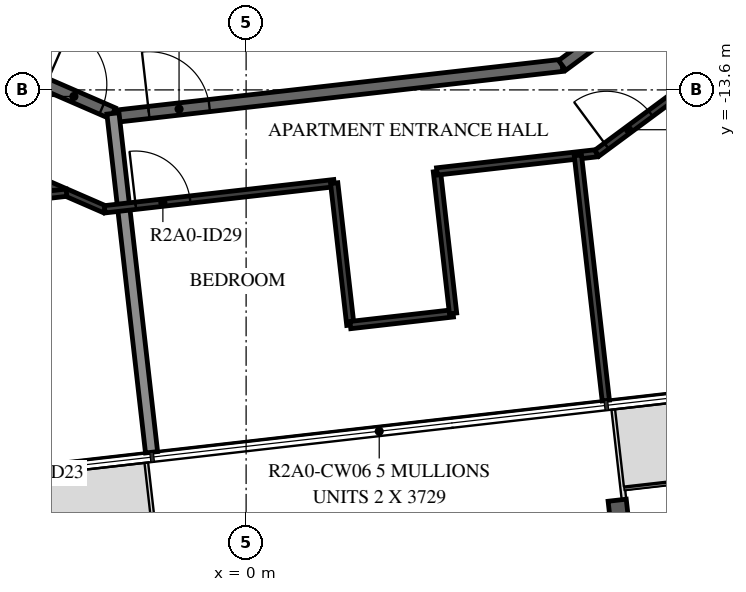
"""IFC4 building model, lengths in metres.
Left out: names, types, materials, properties, quantities, classifications, styles, units other than length and angle.
Written with IfcOpenShell. Run it as: python <this file> out.ifc"""

import sys

from ifc_helpers import new_model, si_unit, direction, frame, frame_2d, origin, origin_2d, place, context, subcontext, project, spatial, rectangle, i_section, extrude, element, fill, save


model = new_model("IFC4")
c1 = context("Model", 3, precision=1e-05, world=origin(), true_north=direction((0.0, 1.0)))
c2 = subcontext(c1, "Body", "Model", "MODEL_VIEW")
j1 = project(units=[si_unit("LENGTHUNIT", "METRE"), si_unit("PLANEANGLEUNIT", "RADIAN")], contexts=[c1])
p1 = place(None, origin())
s1 = spatial("IfcSite", under=j1, at=p1, CompositionType="ELEMENT")
p2 = place(p1, origin())
s2 = spatial("IfcBuilding", under=s1, at=p2, CompositionType="ELEMENT")
p3 = place(p2, frame((0.0, 0.0, 83.7)))
s3 = spatial("IfcBuildingStorey", under=s2, at=p3, CompositionType="ELEMENT", Elevation=83.7)
p4 = place(p3, frame((6.153, -20.795, -0.38), z_axis=(0.0, 0.0, 1.0), x_axis=(-0.993571881569, -0.113202986513, 0.0)))
e1 = element("IfcColumn", 1, at=p4, inside=s3, PredefinedType="COLUMN", context=c2, shape_type="SweptSolid", body=[
    extrude(i_section(OverallWidth=0.3, OverallDepth=0.9, WebThickness=0.019, FlangeThickness=0.035, FilletRadius=0.03, at=origin_2d()), origin(), (0.0, 0.0, 1.0), 3.5),
])
p5 = place(p3, frame((-8.829, -11.1, 0.0), z_axis=(0.0, 0.0, 1.0), x_axis=(0.917063622491, -0.398740908742, 0.0)))
e2 = element("IfcWall", 2, at=p5, inside=s3, PredefinedType="STANDARD", context=c2, shape_type="SweptSolid", body=[
    extrude(rectangle(XDim=7.24, YDim=0.2, at=frame_2d((3.62, 0.0))), origin(), (0.0, 0.0, 1.0), 3.12),
])
p6 = place(p5, frame((6.04, 0.0, 0.0)))
e3 = element("IfcOpeningElement", 3, at=p6, cuts=e2, PredefinedType="OPENING", context=c2, shape_type="SweptSolid", body=[
    extrude(rectangle(XDim=1.0, YDim=2.1, at=frame_2d((0.5, 1.05))), frame((0.0, 0.11, 0.0), z_axis=(0.0, -1.0, 0.0), x_axis=(1.0, 0.0, 0.0)), (0.0, 0.0, 1.0), 0.22),
])
p7 = place(p3, frame((-2.096, -14.028, 0.0), z_axis=(0.0, 0.0, 1.0), x_axis=(0.993569170114, 0.113226782163, 0.0)))
e4 = element("IfcWall", 4, at=p7, inside=s3, PredefinedType="STANDARD", context=c2, shape_type="SweptSolid", body=[
    extrude(rectangle(XDim=7.342, YDim=0.2, at=frame_2d((3.671, 0.0))), origin(), (0.0, 0.0, 1.0), 3.12),
])
p8 = place(p7, frame((0.5, 0.0, 0.0)))
e5 = element("IfcOpeningElement", 5, at=p8, cuts=e4, PredefinedType="OPENING", context=c2, shape_type="SweptSolid", body=[
    extrude(rectangle(XDim=1.0, YDim=2.1, at=frame_2d((0.5, 1.05))), frame((0.0, 0.11, 0.0), z_axis=(0.0, -1.0, 0.0), x_axis=(1.0, 0.0, 0.0)), (0.0, 0.0, 1.0), 0.22),
])
p9 = place(p3, frame((5.198, -13.196, 0.0), z_axis=(0.0, 0.0, 1.0), x_axis=(0.803869883159, 0.594805187394, 0.0)))
e6 = element("IfcWall", 6, at=p9, inside=s3, PredefinedType="STANDARD", context=c2, shape_type="SweptSolid", body=[
    extrude(rectangle(XDim=7.342, YDim=0.2, at=frame_2d((3.671, 0.0))), origin(), (0.0, 0.0, 1.0), 3.12),
])
p10 = place(p3, frame((-1.555, -19.559, 0.0), z_axis=(0.0, 0.0, 1.0), x_axis=(-0.113221250863, 0.993569800443, 0.0)))
e7 = element("IfcWall", 7, at=p10, inside=s3, PredefinedType="STANDARD", context=c2, shape_type="SweptSolid", body=[
    extrude(rectangle(XDim=5.609, YDim=0.2, at=frame_2d((2.804, 0.0))), origin(), (0.0, 0.0, 1.0), 2.73),
])
p11 = place(p3, frame((-9.796, -12.315, 0.0), z_axis=(0.0, 0.0, 1.0), x_axis=(0.917059572812, -0.398750222463, 0.0)))
e8 = element("IfcWall", 8, at=p11, inside=s3, PredefinedType="PARTITIONING", context=c2, shape_type="SweptSolid", body=[
    extrude(rectangle(XDim=8.146, YDim=0.12, at=frame_2d((4.073, 0.0))), origin(), (0.0, 0.0, 1.0), 3.12),
])
p12 = place(p11, frame((0.969, 0.0, 0.0)))
e9 = element("IfcOpeningElement", 9, at=p12, cuts=e8, PredefinedType="OPENING", context=c2, shape_type="SweptSolid", body=[
    extrude(rectangle(XDim=0.8, YDim=2.1, at=frame_2d((0.4, 1.05))), frame((0.0, 0.07, 0.0), z_axis=(0.0, -1.0, 0.0), x_axis=(1.0, 0.0, 0.0)), (0.0, 0.0, 1.0), 0.14),
])
p13 = place(p3, frame((-2.326, -15.563, 0.0), z_axis=(0.0, 0.0, 1.0), x_axis=(0.993575068384, 0.113175012641, 0.0)))
e10 = element("IfcWall", 10, at=p13, inside=s3, PredefinedType="PARTITIONING", context=c2, shape_type="SweptSolid", body=[
    extrude(rectangle(XDim=3.799, YDim=0.12, at=frame_2d((1.899, 0.0))), origin(), (0.0, 0.0, 1.0), 3.12),
])
p14 = place(p13, frame((0.513, 0.0, 0.0)))
e11 = element("IfcOpeningElement", 11, at=p14, cuts=e10, PredefinedType="OPENING", context=c2, shape_type="SweptSolid", body=[
    extrude(rectangle(XDim=0.9, YDim=2.1, at=frame_2d((0.45, 1.05))), frame((0.0, 0.07, 0.0), z_axis=(0.0, -1.0, 0.0), x_axis=(1.0, 0.0, 0.0)), (0.0, 0.0, 1.0), 0.14),
])
p15 = place(p3, frame((-17.437, -16.94, 0.0), z_axis=(0.0, 0.0, 1.0), x_axis=(0.993573314119, 0.113190412448, 0.0)))
e12 = element("IfcWall", 12, at=p15, inside=s3, PredefinedType="PARTITIONING", context=c2, shape_type="SweptSolid", body=[
    extrude(rectangle(XDim=14.576, YDim=0.12, at=frame_2d((7.288, 0.0))), origin(), (0.0, 0.0, 1.0), 3.12),
])
p16 = place(p15, frame((3.201, 0.0, 0.0)))
e13 = element("IfcOpeningElement", 13, at=p16, cuts=e12, PredefinedType="OPENING", context=c2, shape_type="SweptSolid", body=[
    extrude(rectangle(XDim=0.9, YDim=2.1, at=frame_2d((0.45, 1.05))), frame((0.0, 0.07, 0.0), z_axis=(0.0, -1.0, 0.0), x_axis=(1.0, 0.0, 0.0)), (0.0, 0.0, 1.0), 0.14),
])
p17 = place(p15, frame((0.645, 0.0, 0.0)))
e14 = element("IfcOpeningElement", 14, at=p17, cuts=e12, PredefinedType="OPENING", context=c2, shape_type="SweptSolid", body=[
    extrude(rectangle(XDim=0.9, YDim=2.1, at=frame_2d((0.45, 1.05))), frame((0.0, 0.07, 0.0), z_axis=(0.0, -1.0, 0.0), x_axis=(1.0, 0.0, 0.0)), (0.0, 0.0, 1.0), 0.14),
])
p18 = place(p3, frame((1.448, -15.133, 0.0), z_axis=(0.0, 0.0, 1.0), x_axis=(0.113180189053, -0.993574478741, 0.0)))
e15 = element("IfcWall", 15, at=p18, inside=s3, PredefinedType="PARTITIONING", context=c2, shape_type="SweptSolid", body=[
    extrude(rectangle(XDim=2.349, YDim=0.12, at=frame_2d((1.175, 0.0))), origin(), (0.0, 0.0, 1.0), 3.12),
])
p19 = place(p3, frame((1.714, -17.467, 0.0), z_axis=(0.0, 0.0, 1.0), x_axis=(0.993577030812, 0.113157782957, 0.0)))
e16 = element("IfcWall", 16, at=p19, inside=s3, PredefinedType="PARTITIONING", context=c2, shape_type="SweptSolid", body=[
    extrude(rectangle(XDim=1.7, YDim=0.12, at=frame_2d((0.85, 0.0))), origin(), (0.0, 0.0, 1.0), 3.12),
])
p20 = place(p3, frame((3.404, -17.275, 0.0), z_axis=(0.0, 0.0, 1.0), x_axis=(-0.113180189053, 0.993574478741, 0.0)))
e17 = element("IfcWall", 17, at=p20, inside=s3, PredefinedType="PARTITIONING", context=c2, shape_type="SweptSolid", body=[
    extrude(rectangle(XDim=2.349, YDim=0.12, at=frame_2d((1.175, 0.0))), origin(), (0.0, 0.0, 1.0), 3.12),
])
p21 = place(p3, frame((3.138, -14.941, 0.0), z_axis=(0.0, 0.0, 1.0), x_axis=(0.99356355736, 0.113276023437, 0.0)))
e18 = element("IfcWall", 18, at=p21, inside=s3, PredefinedType="PARTITIONING", context=c2, shape_type="SweptSolid", body=[
    extrude(rectangle(XDim=2.647, YDim=0.12, at=frame_2d((1.323, 0.0))), origin(), (0.0, 0.0, 1.0), 3.12),
])
p22 = place(p3, frame((5.767, -14.641, 0.0), z_axis=(0.0, 0.0, 1.0), x_axis=(0.803867427863, 0.594808505673, 0.0)))
e19 = element("IfcWall", 19, at=p22, inside=s3, PredefinedType="PARTITIONING", context=c2, shape_type="SweptSolid", body=[
    extrude(rectangle(XDim=7.316, YDim=0.12, at=frame_2d((3.658, 0.0))), origin(), (0.0, 0.0, 1.0), 3.12),
])
p23 = place(p22, frame((0.2, 0.0, 0.0)))
e20 = element("IfcOpeningElement", 20, at=p23, cuts=e19, PredefinedType="OPENING", context=c2, shape_type="SweptSolid", body=[
    extrude(rectangle(XDim=0.9, YDim=2.1, at=frame_2d((0.45, 1.05))), frame((0.0, 0.07, 0.0), z_axis=(0.0, -1.0, 0.0), x_axis=(1.0, 0.0, 0.0)), (0.0, 0.0, 1.0), 0.14),
])
p24 = place(p22, frame((5.385, 0.0, 0.0)))
e21 = element("IfcOpeningElement", 21, at=p24, cuts=e19, PredefinedType="OPENING", context=c2, shape_type="SweptSolid", body=[
    extrude(rectangle(XDim=0.8, YDim=2.1, at=frame_2d((0.4, 1.05))), frame((0.0, 0.07, 0.0), z_axis=(0.0, -1.0, 0.0), x_axis=(1.0, 0.0, 0.0)), (0.0, 0.0, 1.0), 0.14),
])
p25 = place(p3, frame((5.915, -18.708, 0.0), z_axis=(0.0, 0.0, 1.0), x_axis=(-0.113244511591, 0.993567149515, 0.0)))
e22 = element("IfcWall", 22, at=p25, inside=s3, PredefinedType="PARTITIONING", context=c2, shape_type="SweptSolid", body=[
    extrude(rectangle(XDim=4.057, YDim=0.12, at=frame_2d((2.029, 0.0))), origin(), (0.0, 0.0, 1.0), 2.73),
])
p26 = place(p6, origin())
e23 = element("IfcDoor", 23, at=p26, inside=s3, OperationType="SINGLE_SWING_LEFT", PredefinedType="DOOR", context=c2, shape_type="SweptSolid", body=[
    extrude(rectangle(XDim=1.0, YDim=2.1, at=frame_2d((0.5, 1.05))), frame((0.0, 0.025, 0.0), z_axis=(0.0, -1.0, 0.0), x_axis=(1.0, 0.0, 0.0)), (0.0, 0.0, 1.0), 0.05),
])
fill(e3, e23)
p27 = place(p8, origin())
e24 = element("IfcDoor", 24, at=p27, inside=s3, OperationType="SINGLE_SWING_LEFT", PredefinedType="DOOR", context=c2, shape_type="SweptSolid", body=[
    extrude(rectangle(XDim=1.0, YDim=2.1, at=frame_2d((0.5, 1.05))), frame((0.0, 0.025, 0.0), z_axis=(0.0, -1.0, 0.0), x_axis=(1.0, 0.0, 0.0)), (0.0, 0.0, 1.0), 0.05),
])
fill(e5, e24)
p28 = place(p14, origin())
e25 = element("IfcDoor", 25, at=p28, inside=s3, OperationType="SINGLE_SWING_LEFT", PredefinedType="DOOR", context=c2, shape_type="SweptSolid", body=[
    extrude(rectangle(XDim=0.9, YDim=2.1, at=frame_2d((0.45, 1.05))), frame((0.0, 0.025, 0.0), z_axis=(0.0, -1.0, 0.0), x_axis=(1.0, 0.0, 0.0)), (0.0, 0.0, 1.0), 0.05),
])
fill(e11, e25)
p29 = place(p23, origin())
e26 = element("IfcDoor", 26, at=p29, inside=s3, OperationType="SINGLE_SWING_RIGHT", PredefinedType="DOOR", context=c2, shape_type="SweptSolid", body=[
    extrude(rectangle(XDim=0.9, YDim=2.1, at=frame_2d((0.45, 1.05))), frame((0.0, 0.025, 0.0), z_axis=(0.0, -1.0, 0.0), x_axis=(1.0, 0.0, 0.0)), (0.0, 0.0, 1.0), 0.05),
])
fill(e20, e26)
save(model, sys.argv[1])
